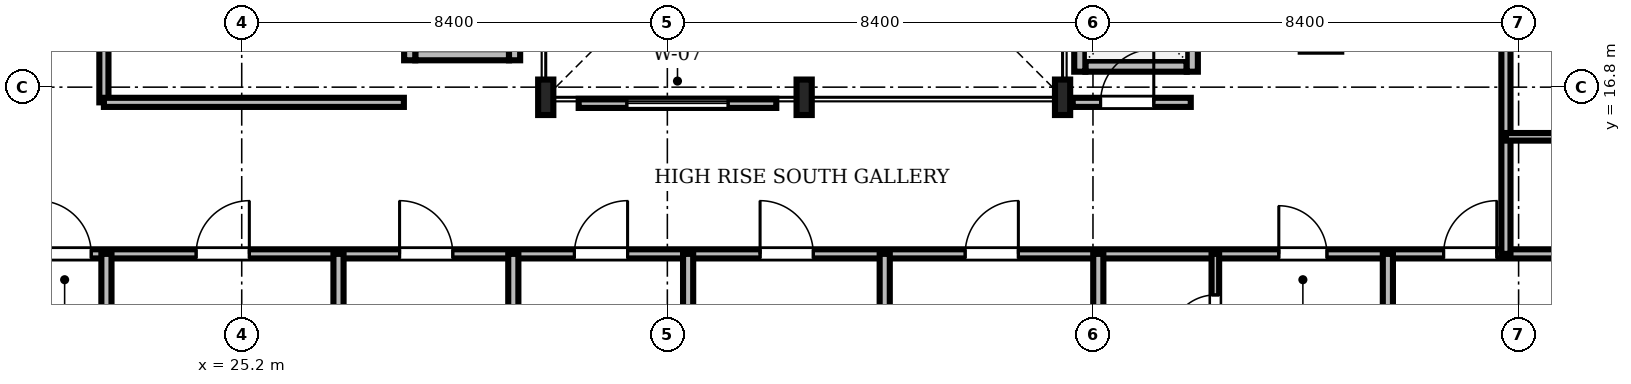
"""IFC4 building model, lengths in metres.
Left out: names, types, materials, properties, quantities, classifications, styles, units other than length and angle.
Written with IfcOpenShell. Run it as: python <this file> out.ifc"""

import sys

from ifc_helpers import new_model, si_unit, direction, frame, frame_2d, origin, origin_2d, place, context, subcontext, project, spatial, rectangle, i_section, extrude, source, transform, mapped, element, fill, save


model = new_model("IFC4")
c1 = context("Model", 3, precision=1e-05, world=origin(), true_north=direction((0.0, 1.0)))
c2 = subcontext(c1, "Body", "Model", "MODEL_VIEW")
j1 = project(units=[si_unit("LENGTHUNIT", "METRE"), si_unit("PLANEANGLEUNIT", "RADIAN")], contexts=[c1])
p1 = place(None, origin())
s1 = spatial("IfcSite", under=j1, at=p1, CompositionType="ELEMENT")
p2 = place(p1, origin())
s2 = spatial("IfcBuilding", under=s1, at=p2, CompositionType="ELEMENT")
p3 = place(p2, frame((0.0, 0.0, 177.2)))
s3 = spatial("IfcBuildingStorey", under=s2, at=p3, CompositionType="ELEMENT", Elevation=177.2)
m1 = source(origin(), c2, "Body", "SweptSolid", [
    extrude(i_section(OverallWidth=0.3, OverallDepth=0.7, WebThickness=0.017, FlangeThickness=0.032, FilletRadius=0.027, at=origin_2d()), origin(), (0.0, 0.0, 1.0), 3.58),
])
for number, where, z_axis, x_axis in (
    (1, (31.2, 16.6, 0.0), (0.0, 0.0, 1.0), (1.0, 0.0, 0.0)),
    (2, (36.3, 16.6, 0.0), (0.0, 0.0, 1.0), (1.0, 0.0, 0.0)),
    (3, (41.4, 16.6, 0.0), (0.0, 0.0, 1.0), (1.0, 0.0, 0.0)),
):
    element("IfcColumn", number, at=place(p3, frame(where, z_axis=z_axis, x_axis=x_axis)), inside=s3, PredefinedType="COLUMN", context=c2, shape_type="MappedRepresentation", body=[
        mapped(m1, transform((0.0, 0.0, 0.0), scale=1.0)),
    ])
m2 = source(origin(), c2, "Body", "SweptSolid", [
    extrude(rectangle(XDim=2.0, YDim=0.22, at=frame_2d((1.0, 0.0))), origin(), (0.0, 0.0, 1.0), 3.58),
])
p4 = place(p3, frame((41.85, 17.215, 0.0), z_axis=(0.0, 0.0, 1.0), x_axis=(1.0, 0.0, 0.0)))
e4 = element("IfcWall", 4, at=p4, inside=s3, PredefinedType="SOLIDWALL", context=c2, shape_type="MappedRepresentation", body=[
    mapped(m2, transform((0.0, 0.0, 0.0), scale=1.0)),
])
m3 = source(origin(), c2, "Body", "SweptSolid", [
    extrude(rectangle(XDim=2.19, YDim=0.22, at=frame_2d((1.095, 0.0))), origin(), (0.0, 0.0, 1.0), 3.58),
])
p5 = place(p3, frame((41.74, 17.105, 0.0), z_axis=(0.0, 0.0, 1.0), x_axis=(0.0, 1.0, 0.0)))
e5 = element("IfcWall", 5, at=p5, inside=s3, PredefinedType="SOLIDWALL", context=c2, shape_type="MappedRepresentation", body=[
    mapped(m3, transform((0.0, 0.0, 0.0), scale=1.0)),
])
p6 = place(p3, frame((43.96, 17.105, 0.0), z_axis=(0.0, 0.0, 1.0), x_axis=(0.0, 1.0, 0.0)))
e6 = element("IfcWall", 6, at=p6, inside=s3, PredefinedType="SOLIDWALL", context=c2, shape_type="MappedRepresentation", body=[
    mapped(m3, transform((0.0, 0.0, 0.0), scale=1.0)),
])
m4 = source(origin(), c2, "Body", "SweptSolid", [
    extrude(rectangle(XDim=1.1, YDim=2.2, at=frame_2d((0.55, 1.1))), frame((0.0, 0.12, 0.0), z_axis=(0.0, -1.0, 0.0), x_axis=(1.0, 0.0, 0.0)), (0.0, 0.0, 1.0), 0.24),
])
p7 = place(p6, frame((0.545, 0.0, 0.0)))
e7 = element("IfcOpeningElement", 7, at=p7, cuts=e6, PredefinedType="OPENING", context=c2, shape_type="MappedRepresentation", body=[
    mapped(m4, transform((0.0, 0.0, 0.0), scale=1.0)),
])
m5 = source(origin(), c2, "Body", "SweptSolid", [
    extrude(rectangle(XDim=1.85, YDim=0.22, at=frame_2d((0.925, 0.0))), origin(), (0.0, 0.0, 1.0), 3.022),
])
p8 = place(p3, frame((28.625, 17.44, 0.0), z_axis=(0.0, 0.0, 1.0), x_axis=(1.0, 0.0, 0.0)))
e8 = element("IfcWall", 8, at=p8, inside=s3, PredefinedType="SOLIDWALL", context=c2, shape_type="MappedRepresentation", body=[
    mapped(m5, transform((0.0, 0.0, 0.0), scale=1.0)),
])
m6 = source(origin(), c2, "Body", "SweptSolid", [
    extrude(rectangle(XDim=2.54, YDim=0.22, at=frame_2d((1.27, 0.0))), origin(), (0.0, 0.0, 1.0), 3.022),
])
p9 = place(p3, frame((28.515, 17.33, 0.0), z_axis=(0.0, 0.0, 1.0), x_axis=(0.0, 1.0, 0.0)))
e9 = element("IfcWall", 9, at=p9, inside=s3, PredefinedType="SOLIDWALL", context=c2, shape_type="MappedRepresentation", body=[
    mapped(m6, transform((0.0, 0.0, 0.0), scale=1.0)),
])
m7 = source(origin(), c2, "Body", "SweptSolid", [
    extrude(rectangle(XDim=2.54, YDim=0.22, at=frame_2d((1.27, 0.0))), origin(), (0.0, 0.0, 1.0), 3.58),
])
p10 = place(p3, frame((30.585, 17.33, 0.0), z_axis=(0.0, 0.0, 1.0), x_axis=(0.0, 1.0, 0.0)))
e10 = element("IfcWall", 10, at=p10, inside=s3, PredefinedType="SOLIDWALL", context=c2, shape_type="MappedRepresentation", body=[
    mapped(m7, transform((0.0, 0.0, 0.0), scale=1.0)),
])
m8 = source(origin(), c2, "Body", "SweptSolid", [
    extrude(rectangle(XDim=46.156, YDim=0.18, at=frame_2d((23.078, 0.0))), origin(), (0.0, 0.0, 1.0), 2.822),
])
p11 = place(p3, frame((11.422, 13.51, 0.0), z_axis=(0.0, 0.0, 1.0), x_axis=(1.0, 0.0, 0.0)))
e11 = element("IfcWall", 11, at=p11, inside=s3, PredefinedType="PARTITIONING", context=c2, shape_type="MappedRepresentation", body=[
    mapped(m8, transform((0.0, 0.0, 0.0), scale=1.0)),
])
m9 = source(origin(), c2, "Body", "SweptSolid", [
    extrude(rectangle(XDim=1.05, YDim=2.2, at=frame_2d((0.525, 1.1))), frame((0.0, 0.1, 0.0), z_axis=(0.0, -1.0, 0.0), x_axis=(1.0, 0.0, 0.0)), (0.0, 0.0, 1.0), 0.2),
])
p12 = place(p11, frame((9.758, 0.0, 0.0)))
e12 = element("IfcOpeningElement", 12, at=p12, cuts=e11, PredefinedType="OPENING", context=c2, shape_type="MappedRepresentation", body=[
    mapped(m9, transform((0.0, 0.0, 0.0), scale=1.0)),
])
p13 = place(p11, frame((12.878, 0.0, 0.0)))
e13 = element("IfcOpeningElement", 13, at=p13, cuts=e11, PredefinedType="OPENING", context=c2, shape_type="MappedRepresentation", body=[
    mapped(m9, transform((0.0, 0.0, 0.0), scale=1.0)),
])
p14 = place(p11, frame((16.893, 0.0, 0.0)))
e14 = element("IfcOpeningElement", 14, at=p14, cuts=e11, PredefinedType="OPENING", context=c2, shape_type="MappedRepresentation", body=[
    mapped(m9, transform((0.0, 0.0, 0.0), scale=1.0)),
])
p15 = place(p11, frame((20.344, 0.0, 0.0)))
e15 = element("IfcOpeningElement", 15, at=p15, cuts=e11, PredefinedType="OPENING", context=c2, shape_type="MappedRepresentation", body=[
    mapped(m9, transform((0.0, 0.0, 0.0), scale=1.0)),
])
p16 = place(p11, frame((24.008, 0.0, 0.0)))
e16 = element("IfcOpeningElement", 16, at=p16, cuts=e11, PredefinedType="OPENING", context=c2, shape_type="MappedRepresentation", body=[
    mapped(m9, transform((0.0, 0.0, 0.0), scale=1.0)),
])
p17 = place(p11, frame((28.055, 0.0, 0.0)))
e17 = element("IfcOpeningElement", 17, at=p17, cuts=e11, PredefinedType="OPENING", context=c2, shape_type="MappedRepresentation", body=[
    mapped(m9, transform((0.0, 0.0, 0.0), scale=1.0)),
])
m10 = source(origin(), c2, "Body", "SweptSolid", [
    extrude(rectangle(XDim=0.95, YDim=2.15, at=frame_2d((0.475, 1.075))), frame((0.0, 0.1, 0.0), z_axis=(0.0, -1.0, 0.0), x_axis=(1.0, 0.0, 0.0)), (0.0, 0.0, 1.0), 0.2),
])
p18 = place(p11, frame((34.246, 0.0, 0.0)))
e18 = element("IfcOpeningElement", 18, at=p18, cuts=e11, PredefinedType="OPENING", context=c2, shape_type="MappedRepresentation", body=[
    mapped(m10, transform((0.0, 0.0, 0.0), scale=1.0)),
])
p19 = place(p11, frame((37.498, 0.0, 0.0)))
e19 = element("IfcOpeningElement", 19, at=p19, cuts=e11, PredefinedType="OPENING", context=c2, shape_type="MappedRepresentation", body=[
    mapped(m9, transform((0.0, 0.0, 0.0), scale=1.0)),
])
m11 = source(origin(), c2, "Body", "SweptSolid", [
    extrude(rectangle(XDim=27.59, YDim=0.18, at=frame_2d((13.795, 0.0))), origin(), (0.0, 0.0, 1.0), 3.022),
])
p20 = place(p3, frame((50.15, 13.51, 0.0), z_axis=(0.0, 0.0, 1.0), x_axis=(0.0, 1.0, 0.0)))
e20 = element("IfcWall", 20, at=p20, inside=s3, PredefinedType="PARTITIONING", context=c2, shape_type="MappedRepresentation", body=[
    mapped(m11, transform((0.0, 0.0, 0.0), scale=1.0)),
])
p21 = place(p20, frame((4.086, 0.0, 0.0)))
e21 = element("IfcOpeningElement", 21, at=p21, cuts=e20, PredefinedType="OPENING", context=c2, shape_type="MappedRepresentation", body=[
    mapped(m9, transform((0.0, 0.0, 0.0), scale=1.0)),
])
p22 = place(p20, frame((9.744, 0.0, 0.0)))
e22 = element("IfcOpeningElement", 22, at=p22, cuts=e20, PredefinedType="OPENING", context=c2, shape_type="MappedRepresentation", body=[
    mapped(m9, transform((0.0, 0.0, 0.0), scale=1.0)),
])
p23 = place(p20, frame((17.771, 0.0, 0.0)))
e23 = element("IfcOpeningElement", 23, at=p23, cuts=e20, PredefinedType="OPENING", context=c2, shape_type="MappedRepresentation", body=[
    mapped(m9, transform((0.0, 0.0, 0.0), scale=1.0)),
])
p24 = place(p20, frame((24.614, 0.0, 0.0)))
e24 = element("IfcOpeningElement", 24, at=p24, cuts=e20, PredefinedType="OPENING", context=c2, shape_type="MappedRepresentation", body=[
    mapped(m9, transform((0.0, 0.0, 0.0), scale=1.0)),
])
m12 = source(origin(), c2, "Body", "SweptSolid", [
    extrude(rectangle(XDim=11.94, YDim=0.18, at=frame_2d((5.97, 0.0))), origin(), (0.0, 0.0, 1.0), 3.022),
])
p25 = place(p3, frame((22.48, 16.5, 0.0), z_axis=(0.0, 0.0, 1.0), x_axis=(0.0, 1.0, 0.0)))
e25 = element("IfcWall", 25, at=p25, inside=s3, PredefinedType="PARTITIONING", context=c2, shape_type="MappedRepresentation", body=[
    mapped(m12, transform((0.0, 0.0, 0.0), scale=1.0)),
])
p26 = place(p25, frame((4.5, 0.0, 0.0)))
e26 = element("IfcOpeningElement", 26, at=p26, cuts=e25, PredefinedType="OPENING", context=c2, shape_type="MappedRepresentation", body=[
    mapped(m9, transform((0.0, 0.0, 0.0), scale=1.0)),
])
m13 = source(origin(), c2, "Body", "SweptSolid", [
    extrude(rectangle(XDim=2.36, YDim=0.15, at=frame_2d((1.18, 0.0))), origin(), (0.0, 0.0, 1.0), 3.242),
])
p27 = place(p3, frame((44.415, 11.15, 0.0), z_axis=(0.0, 0.0, 1.0), x_axis=(0.0, 1.0, 0.0)))
e27 = element("IfcWall", 27, at=p27, inside=s3, PredefinedType="PARTITIONING", context=c2, shape_type="MappedRepresentation", body=[
    mapped(m13, transform((0.0, 0.0, 0.0), scale=1.0)),
])
m14 = source(origin(), c2, "Body", "SweptSolid", [
    extrude(rectangle(XDim=0.9, YDim=2.1, at=frame_2d((0.45, 1.05))), frame((0.0, 0.085, 0.0), z_axis=(0.0, -1.0, 0.0), x_axis=(1.0, 0.0, 0.0)), (0.0, 0.0, 1.0), 0.17),
])
p28 = place(p27, frame((0.65, 0.0, 0.0)))
e28 = element("IfcOpeningElement", 28, at=p28, cuts=e27, PredefinedType="OPENING", context=c2, shape_type="MappedRepresentation", body=[
    mapped(m14, transform((0.0, 0.0, 0.0), scale=1.0)),
])
m15 = source(origin(), c2, "Body", "SweptSolid", [
    extrude(rectangle(XDim=2.33, YDim=0.18, at=frame_2d((1.165, 0.0))), origin(), (0.0, 0.0, 1.0), 3.022),
])
p29 = place(p3, frame((41.6, 16.5, 0.0), z_axis=(0.0, 0.0, 1.0), x_axis=(1.0, 0.0, 0.0)))
e29 = element("IfcWall", 29, at=p29, inside=s3, PredefinedType="PARTITIONING", context=c2, shape_type="MappedRepresentation", body=[
    mapped(m15, transform((0.0, 0.0, 0.0), scale=1.0)),
])
p30 = place(p29, frame((0.55, 0.0, 0.0)))
e30 = element("IfcOpeningElement", 30, at=p30, cuts=e29, PredefinedType="OPENING", context=c2, shape_type="MappedRepresentation", body=[
    mapped(m9, transform((0.0, 0.0, 0.0), scale=1.0)),
])
m16 = source(origin(), c2, "Body", "SweptSolid", [
    extrude(rectangle(XDim=11.388, YDim=0.2, at=frame_2d((5.694, 0.0))), origin(), (0.0, 0.0, 1.0), 2.822),
])
for number, where, z_axis, x_axis in (
    (31, (22.53, 2.122, 0.0), (0.0, 0.0, 1.0), (0.0, 1.0, 0.0)),
    (32, (27.11, 2.122, 0.0), (0.0, 0.0, 1.0), (0.0, 1.0, 0.0)),
    (33, (30.56, 2.122, 0.0), (0.0, 0.0, 1.0), (0.0, 1.0, 0.0)),
):
    element("IfcWall", number, at=place(p3, frame(where, z_axis=z_axis, x_axis=x_axis)), inside=s3, PredefinedType="PARTITIONING", context=c2, shape_type="MappedRepresentation", body=[
        mapped(m16, transform((0.0, 0.0, 0.0), scale=1.0)),
    ])
m17 = source(origin(), c2, "Body", "SweptSolid", [
    extrude(rectangle(XDim=11.58, YDim=0.2, at=frame_2d((5.79, 0.0))), origin(), (0.0, 0.0, 1.0), 2.822),
])
p31 = place(p3, frame((34.01, 1.93, 0.0), z_axis=(0.0, 0.0, 1.0), x_axis=(0.0, 1.0, 0.0)))
e34 = element("IfcWall", 34, at=p31, inside=s3, PredefinedType="PARTITIONING", context=c2, shape_type="MappedRepresentation", body=[
    mapped(m17, transform((0.0, 0.0, 0.0), scale=1.0)),
])
for number, where, z_axis, x_axis in (
    (35, (37.89, 2.122, 0.0), (0.0, 0.0, 1.0), (0.0, 1.0, 0.0)),
    (36, (42.105, 2.122, 0.0), (0.0, 0.0, 1.0), (0.0, 1.0, 0.0)),
    (37, (47.82, 2.122, 0.0), (0.0, 0.0, 1.0), (0.0, 1.0, 0.0)),
):
    element("IfcWall", number, at=place(p3, frame(where, z_axis=z_axis, x_axis=x_axis)), inside=s3, PredefinedType="PARTITIONING", context=c2, shape_type="MappedRepresentation", body=[
        mapped(m16, transform((0.0, 0.0, 0.0), scale=1.0)),
    ])
m18 = source(origin(), c2, "Body", "SweptSolid", [
    extrude(rectangle(XDim=5.92, YDim=0.18, at=frame_2d((2.96, 0.0))), origin(), (0.0, 0.0, 1.0), 3.58),
])
p32 = place(p3, frame((22.48, 16.5, 0.0), z_axis=(0.0, 0.0, 1.0), x_axis=(1.0, 0.0, 0.0)))
e38 = element("IfcWall", 38, at=p32, inside=s3, PredefinedType="PARTITIONING", context=c2, shape_type="MappedRepresentation", body=[
    mapped(m18, transform((0.0, 0.0, 0.0), scale=1.0)),
])
m19 = source(origin(), c2, "Body", "SweptSolid", [
    extrude(rectangle(XDim=2.36, YDim=0.15, at=frame_2d((1.18, 0.0))), origin(), (0.0, 0.0, 1.0), 3.58),
])
p33 = place(p3, frame((50.15, 15.82, 0.0), z_axis=(0.0, 0.0, 1.0), x_axis=(1.0, 0.0, 0.0)))
e39 = element("IfcWall", 39, at=p33, inside=s3, PredefinedType="PARTITIONING", context=c2, shape_type="MappedRepresentation", body=[
    mapped(m19, transform((0.0, 0.0, 0.0), scale=1.0)),
])
m20 = source(origin(), c2, "Body", "SweptSolid", [
    extrude(rectangle(XDim=3.9, YDim=0.18, at=frame_2d((1.95, 0.0))), origin(), (0.0, 0.0, 1.0), 3.122),
])
p34 = place(p3, frame((31.85, 16.48, 0.0), z_axis=(0.0, 0.0, 1.0), x_axis=(1.0, 0.0, 0.0)))
e40 = element("IfcWall", 40, at=p34, inside=s3, PredefinedType="PARTITIONING", context=c2, shape_type="MappedRepresentation", body=[
    mapped(m20, transform((0.0, 0.0, 0.0), scale=1.0)),
])
m21 = source(origin(), c2, "Body", "SweptSolid", [
    extrude(rectangle(XDim=2.0, YDim=1.9, at=frame_2d((1.0, 0.95))), frame((0.0, 0.1, 0.0), z_axis=(0.0, -1.0, 0.0), x_axis=(1.0, 0.0, 0.0)), (0.0, 0.0, 1.0), 0.2),
])
p35 = place(p34, frame((0.95, 0.0, 0.55)))
e41 = element("IfcOpeningElement", 41, at=p35, cuts=e40, PredefinedType="OPENING", context=c2, shape_type="MappedRepresentation", body=[
    mapped(m21, transform((0.0, 0.0, 0.0), scale=1.0)),
])
m22 = source(origin(), c2, "Body", "SweptSolid", [
    extrude(rectangle(XDim=1.05, YDim=2.2, at=frame_2d((0.525, 1.1))), frame((0.0, 0.025, 0.0), z_axis=(0.0, -1.0, 0.0), x_axis=(1.0, 0.0, 0.0)), (0.0, 0.0, 1.0), 0.05),
])
p36 = place(p12, origin())
e42 = element("IfcDoor", 42, at=p36, inside=s3, OperationType="SINGLE_SWING_LEFT", PredefinedType="DOOR", context=c2, shape_type="MappedRepresentation", body=[
    mapped(m22, transform((0.0, 0.0, 0.0), scale=1.0)),
])
fill(e12, e42)
p37 = place(p13, origin())
e43 = element("IfcDoor", 43, at=p37, inside=s3, OperationType="SINGLE_SWING_RIGHT", PredefinedType="DOOR", context=c2, shape_type="MappedRepresentation", body=[
    mapped(m22, transform((0.0, 0.0, 0.0), scale=1.0)),
])
fill(e13, e43)
p38 = place(p14, origin())
e44 = element("IfcDoor", 44, at=p38, inside=s3, OperationType="SINGLE_SWING_LEFT", PredefinedType="DOOR", context=c2, shape_type="MappedRepresentation", body=[
    mapped(m22, transform((0.0, 0.0, 0.0), scale=1.0)),
])
fill(e14, e44)
p39 = place(p15, origin())
e45 = element("IfcDoor", 45, at=p39, inside=s3, OperationType="SINGLE_SWING_RIGHT", PredefinedType="DOOR", context=c2, shape_type="MappedRepresentation", body=[
    mapped(m22, transform((0.0, 0.0, 0.0), scale=1.0)),
])
fill(e15, e45)
p40 = place(p16, origin())
e46 = element("IfcDoor", 46, at=p40, inside=s3, OperationType="SINGLE_SWING_LEFT", PredefinedType="DOOR", context=c2, shape_type="MappedRepresentation", body=[
    mapped(m22, transform((0.0, 0.0, 0.0), scale=1.0)),
])
fill(e16, e46)
p41 = place(p17, origin())
e47 = element("IfcDoor", 47, at=p41, inside=s3, OperationType="SINGLE_SWING_RIGHT", PredefinedType="DOOR", context=c2, shape_type="MappedRepresentation", body=[
    mapped(m22, transform((0.0, 0.0, 0.0), scale=1.0)),
])
fill(e17, e47)
m23 = source(origin(), c2, "Body", "SweptSolid", [
    extrude(rectangle(XDim=0.95, YDim=2.15, at=frame_2d((0.475, 1.075))), frame((0.0, 0.025, 0.0), z_axis=(0.0, -1.0, 0.0), x_axis=(1.0, 0.0, 0.0)), (0.0, 0.0, 1.0), 0.05),
])
p42 = place(p18, origin())
e48 = element("IfcDoor", 48, at=p42, inside=s3, OperationType="SINGLE_SWING_LEFT", PredefinedType="DOOR", context=c2, shape_type="MappedRepresentation", body=[
    mapped(m23, transform((0.0, 0.0, 0.0), scale=1.0)),
])
fill(e18, e48)
p43 = place(p19, origin())
e49 = element("IfcDoor", 49, at=p43, inside=s3, OperationType="SINGLE_SWING_RIGHT", PredefinedType="DOOR", context=c2, shape_type="MappedRepresentation", body=[
    mapped(m22, transform((0.0, 0.0, 0.0), scale=1.0)),
])
fill(e19, e49)
m24 = source(origin(), c2, "Body", "SweptSolid", [
    extrude(rectangle(XDim=0.9, YDim=2.1, at=frame_2d((0.45, 1.05))), frame((0.0, 0.025, 0.0), z_axis=(0.0, -1.0, 0.0), x_axis=(1.0, 0.0, 0.0)), (0.0, 0.0, 1.0), 0.05),
])
p44 = place(p28, origin())
e50 = element("IfcDoor", 50, at=p44, inside=s3, OperationType="SINGLE_SWING_LEFT", PredefinedType="DOOR", context=c2, shape_type="MappedRepresentation", body=[
    mapped(m24, transform((0.0, 0.0, 0.0), scale=1.0)),
])
fill(e28, e50)
p45 = place(p30, origin())
e51 = element("IfcDoor", 51, at=p45, inside=s3, OperationType="SINGLE_SWING_RIGHT", PredefinedType="DOOR", context=c2, shape_type="MappedRepresentation", body=[
    mapped(m22, transform((0.0, 0.0, 0.0), scale=1.0)),
])
fill(e30, e51)
m25 = source(origin(), c2, "Body", "SweptSolid", [
    extrude(rectangle(XDim=2.0, YDim=1.9, at=frame_2d((1.0, 0.95))), frame((0.0, 0.03, 0.0), z_axis=(0.0, -1.0, 0.0), x_axis=(1.0, 0.0, 0.0)), (0.0, 0.0, 1.0), 0.06),
])
p46 = place(p35, origin())
e52 = element("IfcWindow", 52, at=p46, inside=s3, PartitioningType="SINGLE_PANEL", PredefinedType="WINDOW", context=c2, shape_type="MappedRepresentation", body=[
    mapped(m25, transform((0.0, 0.0, 0.0), scale=1.0)),
])
fill(e41, e52)
save(model, sys.argv[1])
